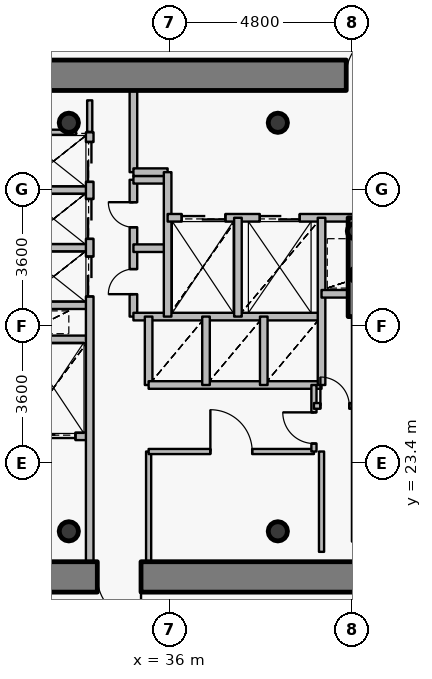
"""IFC4 building model, lengths in metres.
Left out: names, types, materials, properties, quantities, classifications, styles, units other than length and angle.
Written with IfcOpenShell. Run it as: python <this file> out.ifc"""

import sys

from ifc_helpers import new_model, si_unit, direction, frame, frame_2d, origin, origin_2d, place, context, subcontext, project, spatial, rectangle, hollow_circle, extrude, source, transform, mapped, element, fill, save


model = new_model("IFC4")
c1 = context("Model", 3, precision=1e-05, world=origin(), true_north=direction((0.0, 1.0)))
c2 = subcontext(c1, "Body", "Model", "MODEL_VIEW")
j1 = project(units=[si_unit("LENGTHUNIT", "METRE"), si_unit("PLANEANGLEUNIT", "RADIAN")], contexts=[c1])
p1 = place(None, origin())
s1 = spatial("IfcSite", under=j1, at=p1, CompositionType="ELEMENT")
p2 = place(p1, origin())
s2 = spatial("IfcBuilding", under=s1, at=p2, CompositionType="ELEMENT")
p3 = place(p2, frame((0.0, 0.0, 167.4)))
s3 = spatial("IfcBuildingStorey", under=s2, at=p3, CompositionType="ELEMENT", Elevation=167.4)
for number, where, z_axis, x_axis in (
    (1, (33.35, 21.6, 0.0), (0.0, 0.0, 1.0), (1.0, 0.0, 0.0)),
    (2, (38.85, 21.6, 0.0), (0.0, 0.0, 1.0), (1.0, 0.0, 0.0)),
    (3, (38.85, 32.35, 0.0), (0.0, 0.0, 1.0), (1.0, 0.0, 0.0)),
    (4, (33.35, 32.35, 0.0), (0.0, 0.0, 1.0), (1.0, 0.0, 0.0)),
):
    element("IfcColumn", number, at=place(p3, frame(where, z_axis=z_axis, x_axis=x_axis)), inside=s3, PredefinedType="COLUMN", context=c2, shape_type="SweptSolid", body=[
        extrude(hollow_circle(Radius=0.254, WallThickness=0.02, at=origin_2d()), origin(), (0.0, 0.0, 1.0), 3.75),
    ])
for number, where, z_axis, x_axis in (
    (5, (40.95, 28.35, 0.0), (0.0, 0.0, 1.0), (1.0, 0.0, 0.0)),
    (6, (40.88, 29.5, 0.0), (0.0, 0.0, 1.0), (1.0, 0.0, 0.0)),
):
    element("IfcColumn", number, at=place(p3, frame(where, z_axis=z_axis, x_axis=x_axis)), inside=s3, PredefinedType="COLUMN", context=c2, shape_type="SweptSolid", body=[
        extrude(hollow_circle(Radius=0.203, WallThickness=0.016, at=origin_2d()), origin(), (0.0, 0.0, 1.0), 3.75),
    ])
p4 = place(p3, frame((27.2, 33.6, 0.0), z_axis=(0.0, 0.0, 1.0), x_axis=(1.0, 0.0, 0.0)))
e7 = element("IfcWall", 7, at=p4, inside=s3, PredefinedType="SHEAR", context=c2, shape_type="SweptSolid", body=[
    extrude(rectangle(XDim=17.6, YDim=0.8, at=frame_2d((8.8, 0.0))), origin(), (0.0, 0.0, 1.0), 2.95),
])
p5 = place(p4, frame((13.45, 0.0, 0.0)))
e8 = element("IfcOpeningElement", 8, at=p5, cuts=e7, PredefinedType="OPENING", context=c2, shape_type="SweptSolid", body=[
    extrude(rectangle(XDim=1.15, YDim=2.15, at=origin_2d()), frame((0.575, 0.41, 1.075), z_axis=(0.0, -1.0, 0.0), x_axis=(1.0, 0.0, 0.0)), (0.0, 0.0, 1.0), 0.82),
])
p6 = place(p3, frame((44.8, 20.4, 0.0), z_axis=(0.0, 0.0, 1.0), x_axis=(-1.0, 0.0, 0.0)))
e9 = element("IfcWall", 9, at=p6, inside=s3, PredefinedType="SHEAR", context=c2, shape_type="SweptSolid", body=[
    extrude(rectangle(XDim=17.6, YDim=0.8, at=frame_2d((8.8, 0.0))), origin(), (0.0, 0.0, 1.0), 2.95),
])
p7 = place(p6, frame((9.55, 0.0, 0.0)))
e10 = element("IfcOpeningElement", 10, at=p7, cuts=e9, PredefinedType="OPENING", context=c2, shape_type="SweptSolid", body=[
    extrude(rectangle(XDim=1.15, YDim=2.15, at=origin_2d()), frame((0.575, 0.41, 1.075), z_axis=(0.0, -1.0, 0.0), x_axis=(1.0, 0.0, 0.0)), (0.0, 0.0, 1.0), 0.82),
])
p8 = place(p3, frame((40.9, 27.25, 0.0), z_axis=(0.0, 0.0, 1.0), x_axis=(0.0, 1.0, 0.0)))
e11 = element("IfcWall", 11, at=p8, inside=s3, PredefinedType="SHEAR", context=c2, shape_type="SweptSolid", body=[
    extrude(rectangle(XDim=2.6, YDim=0.4, at=frame_2d((1.3, 0.0))), origin(), (0.0, 0.0, 1.0), 3.1),
])
p9 = place(p3, frame((32.0, 24.1, 0.0), z_axis=(0.0, 0.0, 1.0), x_axis=(1.0, 0.0, 0.0)))
e12 = element("IfcWall", 12, at=p9, inside=s3, PredefinedType="PARTITIONING", context=c2, shape_type="SweptSolid", body=[
    extrude(rectangle(XDim=1.9, YDim=0.2, at=frame_2d((0.95, 0.0))), origin(), (0.0, 0.0, 1.0), 3.085),
])
p10 = place(p9, frame((0.375, 0.0, 0.0)))
e13 = element("IfcOpeningElement", 13, at=p10, cuts=e12, PredefinedType="OPENING", context=c2, shape_type="SweptSolid", body=[
    extrude(rectangle(XDim=1.15, YDim=2.15, at=origin_2d()), frame((0.575, 0.11, 1.075), z_axis=(0.0, -1.0, 0.0), x_axis=(1.0, 0.0, 0.0)), (0.0, 0.0, 1.0), 0.22),
])
for number, where, z_axis, x_axis in (
    (14, (32.0, 26.65, 0.0), (0.0, 0.0, 1.0), (1.0, 0.0, 0.0)),
    (15, (32.0, 27.55, 0.0), (0.0, 0.0, 1.0), (1.0, 0.0, 0.0)),
    (16, (32.0, 29.06, 0.0), (0.0, 0.0, 1.0), (1.0, 0.0, 0.0)),
    (17, (32.0, 30.58, 0.0), (0.0, 0.0, 1.0), (1.0, 0.0, 0.0)),
):
    element("IfcWall", number, at=place(p3, frame(where, z_axis=z_axis, x_axis=x_axis)), inside=s3, PredefinedType="PARTITIONING", context=c2, shape_type="SweptSolid", body=[
        extrude(rectangle(XDim=1.9, YDim=0.2, at=frame_2d((0.95, 0.0))), origin(), (0.0, 0.0, 1.0), 3.085),
    ])
p11 = place(p3, frame((33.9, 20.8, 0.0), z_axis=(0.0, 0.0, 1.0), x_axis=(0.0, 1.0, 0.0)))
e18 = element("IfcWall", 18, at=p11, inside=s3, PredefinedType="PARTITIONING", context=c2, shape_type="SweptSolid", body=[
    extrude(rectangle(XDim=11.3, YDim=0.2, at=frame_2d((5.65, 0.0))), origin(), (0.0, 0.0, 1.0), 3.085),
])
p12 = place(p11, frame((6.98, 0.0, 0.0)))
e19 = element("IfcOpeningElement", 19, at=p12, cuts=e18, PredefinedType="OPENING", context=c2, shape_type="SweptSolid", body=[
    extrude(rectangle(XDim=1.05, YDim=2.15, at=origin_2d()), frame((0.525, 0.11, 1.075), z_axis=(0.0, -1.0, 0.0), x_axis=(1.0, 0.0, 0.0)), (0.0, 0.0, 1.0), 0.22),
])
p13 = place(p11, frame((8.495, 0.0, 0.0)))
e20 = element("IfcOpeningElement", 20, at=p13, cuts=e18, PredefinedType="OPENING", context=c2, shape_type="SweptSolid", body=[
    extrude(rectangle(XDim=1.05, YDim=2.15, at=origin_2d()), frame((0.525, 0.11, 1.075), z_axis=(0.0, -1.0, 0.0), x_axis=(1.0, 0.0, 0.0)), (0.0, 0.0, 1.0), 0.22),
])
p14 = place(p11, frame((9.995, 0.0, 0.0)))
e21 = element("IfcOpeningElement", 21, at=p14, cuts=e18, PredefinedType="OPENING", context=c2, shape_type="SweptSolid", body=[
    extrude(rectangle(XDim=1.05, YDim=2.15, at=origin_2d()), frame((0.525, 0.11, 1.075), z_axis=(0.0, -1.0, 0.0), x_axis=(1.0, 0.0, 0.0)), (0.0, 0.0, 1.0), 0.22),
])
p15 = place(p3, frame((35.05, 27.25, 0.0), z_axis=(0.0, 0.0, 1.0), x_axis=(0.0, 1.0, 0.0)))
e22 = element("IfcWall", 22, at=p15, inside=s3, PredefinedType="PARTITIONING", context=c2, shape_type="SweptSolid", body=[
    extrude(rectangle(XDim=3.6, YDim=0.2, at=frame_2d((1.8, 0.0))), origin(), (0.0, 0.0, 1.0), 3.5),
])
p16 = place(p15, frame((0.59, 0.0, 0.0)))
e23 = element("IfcOpeningElement", 23, at=p16, cuts=e22, PredefinedType="OPENING", context=c2, shape_type="SweptSolid", body=[
    extrude(rectangle(XDim=0.66, YDim=2.05, at=origin_2d()), frame((0.33, 0.11, 1.025), z_axis=(0.0, -1.0, 0.0), x_axis=(1.0, 0.0, 0.0)), (0.0, 0.0, 1.0), 0.22),
])
p17 = place(p15, frame((2.35, 0.0, 0.0)))
e24 = element("IfcOpeningElement", 24, at=p17, cuts=e22, PredefinedType="OPENING", context=c2, shape_type="SweptSolid", body=[
    extrude(rectangle(XDim=0.66, YDim=2.05, at=origin_2d()), frame((0.33, 0.11, 1.025), z_axis=(0.0, -1.0, 0.0), x_axis=(1.0, 0.0, 0.0)), (0.0, 0.0, 1.0), 0.22),
])
p18 = place(p3, frame((35.05, 27.25, 0.0), z_axis=(0.0, 0.0, 1.0), x_axis=(1.0, 0.0, 0.0)))
e25 = element("IfcWall", 25, at=p18, inside=s3, PredefinedType="PARTITIONING", context=c2, shape_type="SweptSolid", body=[
    extrude(rectangle(XDim=4.95, YDim=0.2, at=frame_2d((2.475, 0.0))), origin(), (0.0, 0.0, 1.0), 3.085),
])
for number, where, z_axis, x_axis in (
    (26, (35.05, 29.05, 0.0), (0.0, 0.0, 1.0), (1.0, 0.0, 0.0)),
    (27, (35.05, 30.85, 0.0), (0.0, 0.0, 1.0), (1.0, 0.0, 0.0)),
):
    element("IfcWall", number, at=place(p3, frame(where, z_axis=z_axis, x_axis=x_axis)), inside=s3, PredefinedType="PARTITIONING", context=c2, shape_type="SweptSolid", body=[
        extrude(rectangle(XDim=0.9, YDim=0.2, at=frame_2d((0.45, 0.0))), origin(), (0.0, 0.0, 1.0), 3.5),
    ])
p19 = place(p3, frame((35.05, 31.05, 0.0), z_axis=(0.0, 0.0, 1.0), x_axis=(0.0, 1.0, 0.0)))
e28 = element("IfcWall", 28, at=p19, inside=s3, PredefinedType="PARTITIONING", context=c2, shape_type="SweptSolid", body=[
    extrude(rectangle(XDim=2.15, YDim=0.2, at=frame_2d((1.075, 0.0))), origin(), (0.0, 0.0, 1.0), 3.085),
])
p20 = place(p3, frame((35.05, 31.05, 0.0), z_axis=(0.0, 0.0, 1.0), x_axis=(1.0, 0.0, 0.0)))
e29 = element("IfcWall", 29, at=p20, inside=s3, PredefinedType="PARTITIONING", context=c2, shape_type="SweptSolid", body=[
    extrude(rectangle(XDim=0.9, YDim=0.2, at=frame_2d((0.45, 0.0))), origin(), (0.0, 0.0, 1.0), 3.5),
])
p21 = place(p3, frame((35.45, 20.8, 0.0), z_axis=(0.0, 0.0, 1.0), x_axis=(0.0, 1.0, 0.0)))
e30 = element("IfcWall", 30, at=p21, inside=s3, PredefinedType="PARTITIONING", context=c2, shape_type="SweptSolid", body=[
    extrude(rectangle(XDim=2.9, YDim=0.135, at=frame_2d((1.45, 0.0))), origin(), (0.0, 0.0, 1.0), 3.085),
])
p22 = place(p3, frame((35.45, 23.7, 0.0), z_axis=(0.0, 0.0, 1.0), x_axis=(1.0, 0.0, 0.0)))
e31 = element("IfcWall", 31, at=p22, inside=s3, PredefinedType="PARTITIONING", context=c2, shape_type="SweptSolid", body=[
    extrude(rectangle(XDim=4.35, YDim=0.135, at=frame_2d((2.175, 0.0))), origin(), (0.0, 0.0, 1.0), 3.085),
])
p23 = place(p22, frame((1.625, 0.0, 0.0)))
e32 = element("IfcOpeningElement", 32, at=p23, cuts=e31, PredefinedType="OPENING", context=c2, shape_type="SweptSolid", body=[
    extrude(rectangle(XDim=1.1, YDim=2.15, at=origin_2d()), frame((0.55, 0.078, 1.075), z_axis=(0.0, -1.0, 0.0), x_axis=(1.0, 0.0, 0.0)), (0.0, 0.0, 1.0), 0.155),
])
p24 = place(p3, frame((35.45, 25.45, 0.0), z_axis=(0.0, 0.0, 1.0), x_axis=(0.0, 1.0, 0.0)))
e33 = element("IfcWall", 33, at=p24, inside=s3, PredefinedType="PARTITIONING", context=c2, shape_type="SweptSolid", body=[
    extrude(rectangle(XDim=1.8, YDim=0.2, at=frame_2d((0.9, 0.0))), origin(), (0.0, 0.0, 1.0), 3.5),
])
p25 = place(p3, frame((35.45, 25.45, 0.0), z_axis=(0.0, 0.0, 1.0), x_axis=(1.0, 0.0, 0.0)))
e34 = element("IfcWall", 34, at=p25, inside=s3, PredefinedType="PARTITIONING", context=c2, shape_type="SweptSolid", body=[
    extrude(rectangle(XDim=4.55, YDim=0.2, at=frame_2d((2.275, 0.0))), origin(), (0.0, 0.0, 1.0), 3.085),
])
p26 = place(p3, frame((35.95, 27.25, 0.0), z_axis=(0.0, 0.0, 1.0), x_axis=(0.0, 1.0, 0.0)))
e35 = element("IfcWall", 35, at=p26, inside=s3, PredefinedType="PARTITIONING", context=c2, shape_type="SweptSolid", body=[
    extrude(rectangle(XDim=3.8, YDim=0.2, at=frame_2d((1.9, 0.0))), origin(), (0.0, 0.0, 1.0), 3.5),
])
p27 = place(p3, frame((35.95, 29.85, 0.0), z_axis=(0.0, 0.0, 1.0), x_axis=(1.0, 0.0, 0.0)))
e36 = element("IfcWall", 36, at=p27, inside=s3, PredefinedType="PARTITIONING", context=c2, shape_type="SweptSolid", body=[
    extrude(rectangle(XDim=8.49, YDim=0.2, at=frame_2d((4.245, 0.0))), origin(), (0.0, 0.0, 1.0), 3.085),
])
p28 = place(p27, frame((6.1, 0.0, 0.0)))
e37 = element("IfcOpeningElement", 37, at=p28, cuts=e36, PredefinedType="OPENING", context=c2, shape_type="SweptSolid", body=[
    extrude(rectangle(XDim=1.2, YDim=2.15, at=origin_2d()), frame((0.6, 0.11, 1.075), z_axis=(0.0, -1.0, 0.0), x_axis=(1.0, 0.0, 0.0)), (0.0, 0.0, 1.0), 0.22),
])
p29 = place(p27, frame((0.37, 0.0, 0.0)))
e38 = element("IfcOpeningElement", 38, at=p29, cuts=e36, PredefinedType="OPENING", context=c2, shape_type="SweptSolid", body=[
    extrude(rectangle(XDim=1.15, YDim=2.15, at=origin_2d()), frame((0.575, 0.11, 1.075), z_axis=(0.0, -1.0, 0.0), x_axis=(1.0, 0.0, 0.0)), (0.0, 0.0, 1.0), 0.22),
])
p30 = place(p27, frame((2.425, 0.0, 0.0)))
e39 = element("IfcOpeningElement", 39, at=p30, cuts=e36, PredefinedType="OPENING", context=c2, shape_type="SweptSolid", body=[
    extrude(rectangle(XDim=1.05, YDim=2.15, at=origin_2d()), frame((0.525, 0.11, 1.075), z_axis=(0.0, -1.0, 0.0), x_axis=(1.0, 0.0, 0.0)), (0.0, 0.0, 1.0), 0.22),
])
p31 = place(p3, frame((36.96, 25.45, 0.0), z_axis=(0.0, 0.0, 1.0), x_axis=(0.0, 1.0, 0.0)))
e40 = element("IfcWall", 40, at=p31, inside=s3, PredefinedType="PARTITIONING", context=c2, shape_type="SweptSolid", body=[
    extrude(rectangle(XDim=1.8, YDim=0.2, at=frame_2d((0.9, 0.0))), origin(), (0.0, 0.0, 1.0), 3.5),
])
p32 = place(p3, frame((37.8, 27.25, 0.0), z_axis=(0.0, 0.0, 1.0), x_axis=(0.0, 1.0, 0.0)))
e41 = element("IfcWall", 41, at=p32, inside=s3, PredefinedType="PARTITIONING", context=c2, shape_type="SweptSolid", body=[
    extrude(rectangle(XDim=2.6, YDim=0.2, at=frame_2d((1.3, 0.0))), origin(), (0.0, 0.0, 1.0), 3.5),
])
p33 = place(p3, frame((38.48, 25.45, 0.0), z_axis=(0.0, 0.0, 1.0), x_axis=(0.0, 1.0, 0.0)))
e42 = element("IfcWall", 42, at=p33, inside=s3, PredefinedType="PARTITIONING", context=c2, shape_type="SweptSolid", body=[
    extrude(rectangle(XDim=1.8, YDim=0.2, at=frame_2d((0.9, 0.0))), origin(), (0.0, 0.0, 1.0), 3.5),
])
p34 = place(p3, frame((39.8, 23.7, 0.0), z_axis=(0.0, 0.0, 1.0), x_axis=(0.0, 1.0, 0.0)))
e43 = element("IfcWall", 43, at=p34, inside=s3, PredefinedType="PARTITIONING", context=c2, shape_type="SweptSolid", body=[
    extrude(rectangle(XDim=1.75, YDim=0.135, at=frame_2d((0.875, 0.0))), origin(), (0.0, 0.0, 1.0), 3.5),
])
p35 = place(p34, frame((0.21, 0.0, 0.0)))
e44 = element("IfcOpeningElement", 44, at=p35, cuts=e43, PredefinedType="OPENING", context=c2, shape_type="SweptSolid", body=[
    extrude(rectangle(XDim=0.82, YDim=2.1, at=origin_2d()), frame((0.41, 0.078, 1.05), z_axis=(0.0, -1.0, 0.0), x_axis=(1.0, 0.0, 0.0)), (0.0, 0.0, 1.0), 0.155),
])
p36 = place(p3, frame((39.8, 24.9, 0.0), z_axis=(0.0, 0.0, 1.0), x_axis=(1.0, 0.0, 0.0)))
e45 = element("IfcWall", 45, at=p36, inside=s3, PredefinedType="PARTITIONING", context=c2, shape_type="SweptSolid", body=[
    extrude(rectangle(XDim=1.1, YDim=0.15, at=frame_2d((0.55, 0.0))), origin(), (0.0, 0.0, 1.0), 3.5),
])
p37 = place(p36, frame((0.17, 0.0, 0.0)))
e46 = element("IfcOpeningElement", 46, at=p37, cuts=e45, PredefinedType="OPENING", context=c2, shape_type="SweptSolid", body=[
    extrude(rectangle(XDim=0.76, YDim=2.1, at=origin_2d()), frame((0.38, 0.085, 1.05), z_axis=(0.0, -1.0, 0.0), x_axis=(1.0, 0.0, 0.0)), (0.0, 0.0, 1.0), 0.17),
])
p38 = place(p3, frame((40.0, 25.45, 0.0), z_axis=(0.0, 0.0, 1.0), x_axis=(0.0, 1.0, 0.0)))
e47 = element("IfcWall", 47, at=p38, inside=s3, PredefinedType="PARTITIONING", context=c2, shape_type="SweptSolid", body=[
    extrude(rectangle(XDim=4.4, YDim=0.2, at=frame_2d((2.2, 0.0))), origin(), (0.0, 0.0, 1.0), 3.5),
])
p39 = place(p3, frame((40.0, 27.85, 0.0), z_axis=(0.0, 0.0, 1.0), x_axis=(1.0, 0.0, 0.0)))
e48 = element("IfcWall", 48, at=p39, inside=s3, PredefinedType="PARTITIONING", context=c2, shape_type="SweptSolid", body=[
    extrude(rectangle(XDim=0.9, YDim=0.2, at=frame_2d((0.45, 0.0))), origin(), (0.0, 0.0, 1.0), 3.5),
])
p40 = place(p3, frame((40.9, 21.33, 0.0), z_axis=(0.0, 0.0, 1.0), x_axis=(0.0, 1.0, 0.0)))
e49 = element("IfcWall", 49, at=p40, inside=s3, PredefinedType="PARTITIONING", context=c2, shape_type="SweptSolid", body=[
    extrude(rectangle(XDim=5.91, YDim=0.2, at=frame_2d((2.955, 0.0))), origin(), (0.0, 0.0, 1.0), 3.035),
])
p41 = place(p3, frame((32.36, 32.1, 0.0), z_axis=(0.0, 0.0, 1.0), x_axis=(1.0, 0.0, 0.0)))
e50 = element("IfcWall", 50, at=p41, inside=s3, PredefinedType="PARTITIONING", context=c2, shape_type="SweptSolid", body=[
    extrude(rectangle(XDim=1.18, YDim=0.135, at=frame_2d((0.59, 0.0))), origin(), (0.0, 0.0, 1.0), 3.085),
])
p42 = place(p3, frame((40.0, 23.7, 0.0), z_axis=(0.0, 0.0, 1.0), x_axis=(0.0, -1.0, 0.0)))
e51 = element("IfcWall", 51, at=p42, inside=s3, PredefinedType="PARTITIONING", context=c2, shape_type="SweptSolid", body=[
    extrude(rectangle(XDim=2.64, YDim=0.135, at=frame_2d((1.32, 0.0))), origin(), (0.0, 0.0, 1.0), 3.035),
])
p43 = place(p3, frame((33.9, 32.11, 0.0), z_axis=(0.0, 0.0, 1.0), x_axis=(0.0, 1.0, 0.0)))
e52 = element("IfcWall", 52, at=p43, inside=s3, PredefinedType="PARTITIONING", context=c2, shape_type="SweptSolid", body=[
    extrude(rectangle(XDim=0.83, YDim=0.135, at=frame_2d((0.415, 0.0))), origin(), (0.0, 0.0, 1.0), 3.085),
])
m1 = source(origin(), c2, "Body", "SweptSolid", [
    extrude(rectangle(XDim=1.15, YDim=2.15, at=origin_2d()), frame((0.575, 0.025, 1.075), z_axis=(0.0, -1.0, 0.0), x_axis=(1.0, 0.0, 0.0)), (0.0, 0.0, 1.0), 0.05),
])
p44 = place(p5, origin())
e53 = element("IfcDoor", 53, at=p44, inside=s3, OperationType="SINGLE_SWING_RIGHT", PredefinedType="DOOR", context=c2, shape_type="MappedRepresentation", body=[
    mapped(m1, transform((0.0, 0.0, 0.0), x_axis=(1.0, 0.0, 0.0), y_axis=(0.0, 1.0, 0.0), z_axis=(0.0, 0.0, 1.0), scale=1.0)),
])
fill(e8, e53)
p45 = place(p7, origin())
e54 = element("IfcDoor", 54, at=p45, inside=s3, OperationType="SINGLE_SWING_LEFT", PredefinedType="DOOR", context=c2, shape_type="MappedRepresentation", body=[
    mapped(m1, transform((0.0, 0.0, 0.0), x_axis=(1.0, 0.0, 0.0), y_axis=(0.0, 1.0, 0.0), z_axis=(0.0, 0.0, 1.0), scale=1.0)),
])
fill(e10, e54)
m2 = source(origin(), c2, "Body", "SweptSolid", [
    extrude(rectangle(XDim=1.15, YDim=2.15, at=origin_2d()), frame((0.575, 0.025, 1.075), z_axis=(0.0, -1.0, 0.0), x_axis=(1.0, 0.0, 0.0)), (0.0, 0.0, 1.0), 0.05),
])
p46 = place(p29, origin())
e55 = element("IfcDoor", 55, at=p46, inside=s3, OperationType="DOUBLE_DOOR_SLIDING", PredefinedType="USERDEFINED", context=c2, shape_type="MappedRepresentation", body=[
    mapped(m2, transform((0.0, 0.0, 0.0), x_axis=(1.0, 0.0, 0.0), y_axis=(0.0, 1.0, 0.0), z_axis=(0.0, 0.0, 1.0), scale=1.0)),
])
fill(e38, e55)
p47 = place(p10, origin())
e56 = element("IfcDoor", 56, at=p47, inside=s3, OperationType="DOUBLE_DOOR_SLIDING", PredefinedType="USERDEFINED", context=c2, shape_type="MappedRepresentation", body=[
    mapped(m2, transform((0.0, 0.0, 0.0), x_axis=(1.0, 0.0, 0.0), y_axis=(0.0, 1.0, 0.0), z_axis=(0.0, 0.0, 1.0), scale=1.0)),
])
fill(e13, e56)
m3 = source(origin(), c2, "Body", "SweptSolid", [
    extrude(rectangle(XDim=1.05, YDim=2.15, at=origin_2d()), frame((0.525, 0.025, 1.075), z_axis=(0.0, -1.0, 0.0), x_axis=(1.0, 0.0, 0.0)), (0.0, 0.0, 1.0), 0.05),
])
p48 = place(p30, origin())
e57 = element("IfcDoor", 57, at=p48, inside=s3, OperationType="DOUBLE_DOOR_SLIDING", PredefinedType="USERDEFINED", context=c2, shape_type="MappedRepresentation", body=[
    mapped(m3, transform((0.0, 0.0, 0.0), x_axis=(1.0, 0.0, 0.0), y_axis=(0.0, 1.0, 0.0), z_axis=(0.0, 0.0, 1.0), scale=1.0)),
])
fill(e39, e57)
p49 = place(p12, origin())
e58 = element("IfcDoor", 58, at=p49, inside=s3, OperationType="DOUBLE_DOOR_SLIDING", PredefinedType="USERDEFINED", context=c2, shape_type="MappedRepresentation", body=[
    mapped(m3, transform((0.0, 0.0, 0.0), x_axis=(1.0, 0.0, 0.0), y_axis=(0.0, 1.0, 0.0), z_axis=(0.0, 0.0, 1.0), scale=1.0)),
])
fill(e19, e58)
p50 = place(p13, origin())
e59 = element("IfcDoor", 59, at=p50, inside=s3, OperationType="DOUBLE_DOOR_SLIDING", PredefinedType="USERDEFINED", context=c2, shape_type="MappedRepresentation", body=[
    mapped(m3, transform((0.0, 0.0, 0.0), x_axis=(1.0, 0.0, 0.0), y_axis=(0.0, 1.0, 0.0), z_axis=(0.0, 0.0, 1.0), scale=1.0)),
])
fill(e20, e59)
p51 = place(p14, origin())
e60 = element("IfcDoor", 60, at=p51, inside=s3, OperationType="DOUBLE_DOOR_SLIDING", PredefinedType="USERDEFINED", context=c2, shape_type="MappedRepresentation", body=[
    mapped(m3, transform((0.0, 0.0, 0.0), x_axis=(1.0, 0.0, 0.0), y_axis=(0.0, 1.0, 0.0), z_axis=(0.0, 0.0, 1.0), scale=1.0)),
])
fill(e21, e60)
m4 = source(origin(), c2, "Body", "SweptSolid", [
    extrude(rectangle(XDim=0.66, YDim=2.05, at=origin_2d()), frame((0.33, 0.025, 1.025), z_axis=(0.0, -1.0, 0.0), x_axis=(1.0, 0.0, 0.0)), (0.0, 0.0, 1.0), 0.05),
])
p52 = place(p16, origin())
e61 = element("IfcDoor", 61, at=p52, inside=s3, OperationType="SINGLE_SWING_LEFT", PredefinedType="USERDEFINED", context=c2, shape_type="MappedRepresentation", body=[
    mapped(m4, transform((0.0, 0.0, 0.0), x_axis=(1.0, 0.0, 0.0), y_axis=(0.0, 1.0, 0.0), z_axis=(0.0, 0.0, 1.0), scale=1.0)),
])
fill(e23, e61)
p53 = place(p17, origin())
e62 = element("IfcDoor", 62, at=p53, inside=s3, OperationType="SINGLE_SWING_RIGHT", PredefinedType="USERDEFINED", context=c2, shape_type="MappedRepresentation", body=[
    mapped(m4, transform((0.0, 0.0, 0.0), x_axis=(1.0, 0.0, 0.0), y_axis=(0.0, 1.0, 0.0), z_axis=(0.0, 0.0, 1.0), scale=1.0)),
])
fill(e24, e62)
m5 = source(origin(), c2, "Body", "SweptSolid", [
    extrude(rectangle(XDim=1.1, YDim=2.15, at=origin_2d()), frame((0.55, 0.025, 1.075), z_axis=(0.0, -1.0, 0.0), x_axis=(1.0, 0.0, 0.0)), (0.0, 0.0, 1.0), 0.05),
])
p54 = place(p23, origin())
e63 = element("IfcDoor", 63, at=p54, inside=s3, OperationType="SINGLE_SWING_LEFT", PredefinedType="DOOR", context=c2, shape_type="MappedRepresentation", body=[
    mapped(m5, transform((0.0, 0.0, 0.0), x_axis=(1.0, 0.0, 0.0), y_axis=(0.0, 1.0, 0.0), z_axis=(0.0, 0.0, 1.0), scale=1.0)),
])
fill(e32, e63)
m6 = source(origin(), c2, "Body", "SweptSolid", [
    extrude(rectangle(XDim=0.82, YDim=2.1, at=origin_2d()), frame((0.41, 0.025, 1.05), z_axis=(0.0, -1.0, 0.0), x_axis=(1.0, 0.0, 0.0)), (0.0, 0.0, 1.0), 0.05),
])
p55 = place(p35, origin())
e64 = element("IfcDoor", 64, at=p55, inside=s3, OperationType="SINGLE_SWING_RIGHT", PredefinedType="DOOR", context=c2, shape_type="MappedRepresentation", body=[
    mapped(m6, transform((0.0, 0.0, 0.0), x_axis=(1.0, 0.0, 0.0), y_axis=(0.0, 1.0, 0.0), z_axis=(0.0, 0.0, 1.0), scale=1.0)),
])
fill(e44, e64)
m7 = source(origin(), c2, "Body", "SweptSolid", [
    extrude(rectangle(XDim=0.76, YDim=2.1, at=origin_2d()), frame((0.38, 0.025, 1.05), z_axis=(0.0, -1.0, 0.0), x_axis=(1.0, 0.0, 0.0)), (0.0, 0.0, 1.0), 0.05),
])
p56 = place(p37, origin())
e65 = element("IfcDoor", 65, at=p56, inside=s3, OperationType="SINGLE_SWING_LEFT", PredefinedType="DOOR", context=c2, shape_type="MappedRepresentation", body=[
    mapped(m7, transform((0.0, 0.0, 0.0), x_axis=(1.0, 0.0, 0.0), y_axis=(0.0, 1.0, 0.0), z_axis=(0.0, 0.0, 1.0), scale=1.0)),
])
fill(e46, e65)
save(model, sys.argv[1])
